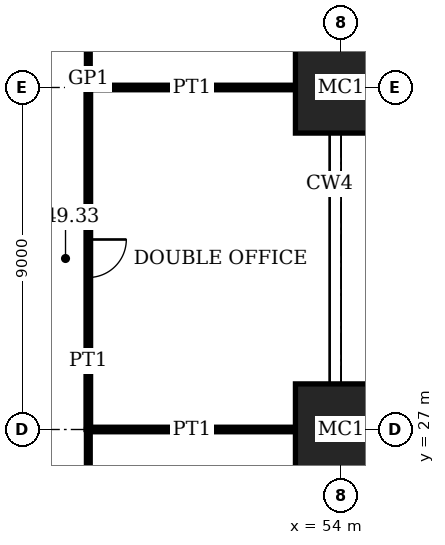
"""IFC4 building model, lengths in metres.
Left out: names, types, materials, properties, quantities, classifications, styles, units other than length and angle.
Written with IfcOpenShell. Run it as: python <this file> out.ifc"""

import sys

from ifc_helpers import new_model, si_unit, direction, frame, frame_2d, origin, origin_2d, place, context, subcontext, project, spatial, rectangle, extrude, element, fill, save


model = new_model("IFC4")
c1 = context("Model", 3, precision=1e-05, world=origin(), true_north=direction((0.0, 1.0)))
c2 = subcontext(c1, "Body", "Model", "MODEL_VIEW")
j1 = project(units=[si_unit("LENGTHUNIT", "METRE"), si_unit("PLANEANGLEUNIT", "RADIAN")], contexts=[c1])
p1 = place(None, origin())
s1 = spatial("IfcSite", under=j1, at=p1, CompositionType="ELEMENT")
p2 = place(p1, origin())
s2 = spatial("IfcBuilding", under=s1, at=p2, CompositionType="ELEMENT")
p3 = place(p2, frame((0.0, 0.0, 202.2)))
s3 = spatial("IfcBuildingStorey", under=s2, at=p3, CompositionType="ELEMENT", Elevation=202.2)
for number, where, z_axis, x_axis in (
    (1, (54.0, 27.0, 0.0), (0.0, 0.0, 1.0), (1.0, 0.0, 0.0)),
    (2, (54.0, 36.0, 0.0), (0.0, 0.0, 1.0), (1.0, 0.0, 0.0)),
):
    element("IfcColumn", number, at=place(p3, frame(where, z_axis=z_axis, x_axis=x_axis)), inside=s3, PredefinedType="COLUMN", context=c2, shape_type="SweptSolid", body=[
        extrude(rectangle(XDim=2.4, YDim=2.4, at=origin_2d()), origin(), (0.0, 0.0, 1.0), 4.0),
    ])
for number, where, z_axis, x_axis in (
    (3, (47.35, 27.0, 0.0), (0.0, 0.0, 1.0), (1.0, 0.0, 0.0)),
    (4, (47.35, 36.0, 0.0), (0.0, 0.0, 1.0), (1.0, 0.0, 0.0)),
):
    element("IfcWall", number, at=place(p3, frame(where, z_axis=z_axis, x_axis=x_axis)), inside=s3, PredefinedType="PARTITIONING", context=c2, shape_type="SweptSolid", body=[
        extrude(rectangle(XDim=5.45, YDim=0.12, at=frame_2d((2.725, 0.0))), origin(), (0.0, 0.0, 1.0), 3.05),
    ])
p4 = place(p3, frame((47.35, 27.0, 0.0), z_axis=(0.0, 0.0, 1.0), x_axis=(0.0, 1.0, 0.0)))
e5 = element("IfcWall", 5, at=p4, inside=s3, PredefinedType="PARTITIONING", context=c2, shape_type="SweptSolid", body=[
    extrude(rectangle(XDim=9.0, YDim=0.12, at=frame_2d((4.5, 0.0))), origin(), (0.0, 0.0, 1.0), 3.75),
])
p5 = place(p4, frame((4.0, 0.0, 0.0)))
e6 = element("IfcOpeningElement", 6, at=p5, cuts=e5, PredefinedType="OPENING", context=c2, shape_type="SweptSolid", body=[
    extrude(rectangle(XDim=1.0, YDim=2.4, at=frame_2d((0.5, 1.2))), frame((0.0, 0.07, 0.0), z_axis=(0.0, -1.0, 0.0), x_axis=(1.0, 0.0, 0.0)), (0.0, 0.0, 1.0), 0.14),
])
p6 = place(p3, frame((47.35, 18.0, 0.0), z_axis=(0.0, 0.0, 1.0), x_axis=(0.0, 1.0, 0.0)))
e7 = element("IfcWall", 7, at=p6, inside=s3, PredefinedType="PARTITIONING", context=c2, shape_type="SweptSolid", body=[
    extrude(rectangle(XDim=9.0, YDim=0.1, at=frame_2d((4.5, 0.0))), origin(), (0.0, 0.0, 1.0), 3.75),
])
p7 = place(p6, frame((4.0, 0.0, 0.0)))
e8 = element("IfcOpeningElement", 8, at=p7, cuts=e7, PredefinedType="OPENING", context=c2, shape_type="SweptSolid", body=[
    extrude(rectangle(XDim=1.0, YDim=2.4, at=frame_2d((0.5, 1.2))), frame((0.0, 0.06, 0.0), z_axis=(0.0, -1.0, 0.0), x_axis=(1.0, 0.0, 0.0)), (0.0, 0.0, 1.0), 0.12),
])
p8 = place(p3, frame((47.35, 36.0, 0.0), z_axis=(0.0, 0.0, 1.0), x_axis=(0.0, 1.0, 0.0)))
e9 = element("IfcWall", 9, at=p8, inside=s3, PredefinedType="PARTITIONING", context=c2, shape_type="SweptSolid", body=[
    extrude(rectangle(XDim=2.35, YDim=0.1, at=frame_2d((1.175, 0.0))), origin(), (0.0, 0.0, 1.0), 3.75),
])
p9 = place(p5, origin())
e10 = element("IfcDoor", 10, at=p9, inside=s3, OperationType="SINGLE_SWING_RIGHT", PredefinedType="DOOR", context=c2, shape_type="SweptSolid", body=[
    extrude(rectangle(XDim=1.0, YDim=2.4, at=frame_2d((0.5, 1.2))), frame((0.0, 0.025, 0.0), z_axis=(0.0, -1.0, 0.0), x_axis=(1.0, 0.0, 0.0)), (0.0, 0.0, 1.0), 0.05),
])
fill(e6, e10)
save(model, sys.argv[1])
